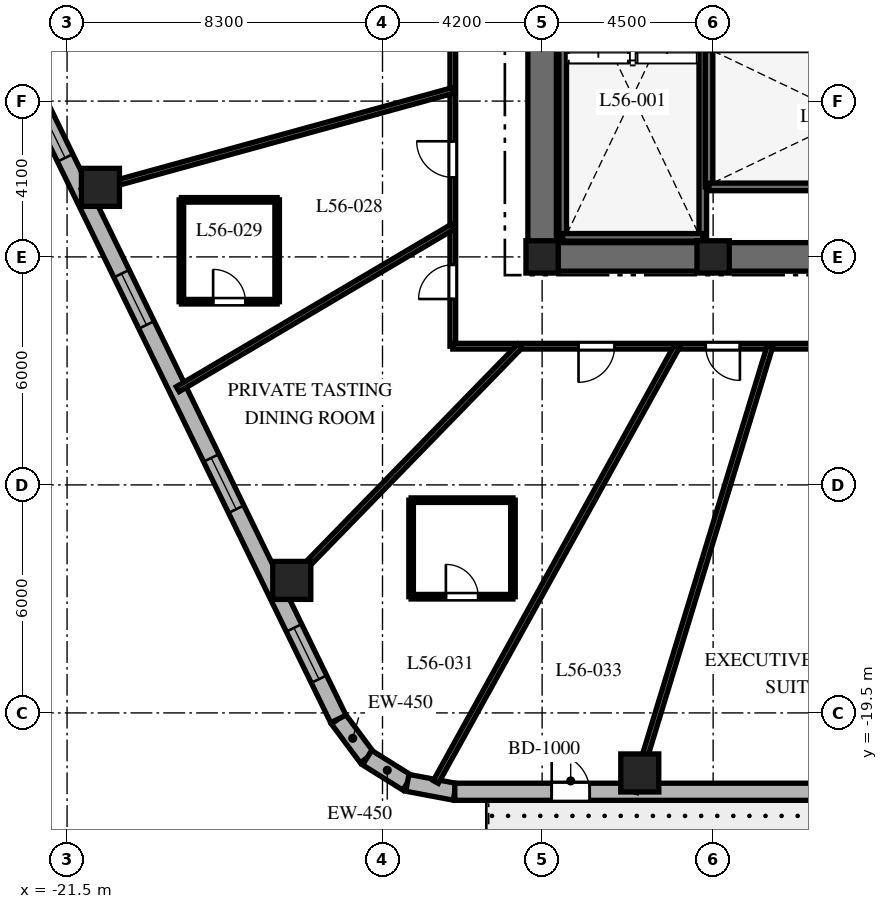
"""IFC4 building model, lengths in metres.
Left out: names, types, materials, properties, quantities, classifications, styles, units other than length and angle.
Written with IfcOpenShell. Run it as: python <this file> out.ifc"""

import sys

from ifc_helpers import new_model, si_unit, direction, frame, frame_2d, origin, origin_2d, place, context, subcontext, project, spatial, rectangle, extrude, element, fill, save


model = new_model("IFC4")
c1 = context("Model", 3, precision=1e-05, world=origin(), true_north=direction((0.0, 1.0)))
c2 = subcontext(c1, "Body", "Model", "MODEL_VIEW")
j1 = project(units=[si_unit("LENGTHUNIT", "METRE"), si_unit("PLANEANGLEUNIT", "RADIAN")], contexts=[c1])
p1 = place(None, origin())
s1 = spatial("IfcSite", under=j1, at=p1, CompositionType="ELEMENT")
p2 = place(p1, origin())
s2 = spatial("IfcBuilding", under=s1, at=p2, CompositionType="ELEMENT")
p3 = place(p2, frame((0.0, 0.0, 225.5)))
s3 = spatial("IfcBuildingStorey", under=s2, at=p3, CompositionType="ELEMENT", Elevation=225.5)
p4 = place(p3, frame((-9.375, -7.5, 0.0), z_axis=(0.0, 0.0, 1.0), x_axis=(1.0, 0.0, 0.0)))
e1 = element("IfcWall", 1, at=p4, inside=s3, PredefinedType="SHEAR", context=c2, shape_type="SweptSolid", body=[
    extrude(rectangle(XDim=18.75, YDim=0.75, at=frame_2d((9.375, 0.0))), origin(), (0.0, 0.0, 1.0), 3.8),
])
p5 = place(p4, frame((9.425, 0.0, 0.0)))
e2 = element("IfcOpeningElement", 2, at=p5, cuts=e1, PredefinedType="OPENING", context=c2, shape_type="SweptSolid", body=[
    extrude(rectangle(XDim=1.0, YDim=2.15, at=frame_2d((0.5, 1.075))), frame((0.0, 0.385, 0.0), z_axis=(0.0, -1.0, 0.0), x_axis=(1.0, 0.0, 0.0)), (0.0, 0.0, 1.0), 0.77),
])
p6 = place(p3, frame((-9.0, -7.125, 0.0), z_axis=(0.0, 0.0, 1.0), x_axis=(0.0, 1.0, 0.0)))
e3 = element("IfcWall", 3, at=p6, inside=s3, PredefinedType="SHEAR", context=c2, shape_type="SweptSolid", body=[
    extrude(rectangle(XDim=14.25, YDim=0.75, at=frame_2d((7.125, 0.0))), origin(), (0.0, 0.0, 1.0), 3.8),
])
p7 = place(p6, frame((10.25, 0.0, 0.0)))
e4 = element("IfcOpeningElement", 4, at=p7, cuts=e3, PredefinedType="OPENING", context=c2, shape_type="SweptSolid", body=[
    extrude(rectangle(XDim=1.05, YDim=2.15, at=frame_2d((0.525, 1.075))), frame((0.0, 0.385, 0.0), z_axis=(0.0, -1.0, 0.0), x_axis=(1.0, 0.0, 0.0)), (0.0, 0.0, 1.0), 0.77),
])
for number, where, z_axis, x_axis in (
    (5, (-8.458, -6.985, 0.0), (0.0, 0.0, 1.0), (0.0, 1.0, 0.0)),
    (6, (-4.772, -6.985, 0.0), (0.0, 0.0, 1.0), (0.0, 1.0, 0.0)),
):
    element("IfcWall", number, at=place(p3, frame(where, z_axis=z_axis, x_axis=x_axis)), inside=s3, PredefinedType="SHEAR", context=c2, shape_type="SweptSolid", body=[
        extrude(rectangle(XDim=9.143, YDim=0.2, at=frame_2d((4.572, 0.0))), origin(), (0.0, 0.0, 1.0), 3.8),
    ])
for number, where, z_axis, x_axis in (
    (7, (-8.458, -6.985, 0.0), (0.0, 0.0, 1.0), (1.0, 0.0, 0.0)),
    (8, (-4.608, -5.658, 0.0), (0.0, 0.0, 1.0), (0.0, 1.0, 0.0)),
):
    element("IfcWall", number, at=place(p3, frame(where, z_axis=z_axis, x_axis=x_axis)), inside=s3, PredefinedType="SHEAR", context=c2, shape_type="SweptSolid", body=[
        extrude(rectangle(XDim=3.686, YDim=0.2, at=frame_2d((1.843, 0.0))), origin(), (0.0, 0.0, 1.0), 3.8),
    ])
p8 = place(p3, frame((-4.608, -5.658, 0.0), z_axis=(0.0, 0.0, 1.0), x_axis=(1.0, 0.0, 0.0)))
e9 = element("IfcWall", 9, at=p8, inside=s3, PredefinedType="SHEAR", context=c2, shape_type="SweptSolid", body=[
    extrude(rectangle(XDim=9.166, YDim=0.2, at=frame_2d((4.583, 0.0))), origin(), (0.0, 0.0, 1.0), 3.8),
])
p9 = place(p8, frame((7.45, 0.0, 0.0)))
e10 = element("IfcOpeningElement", 10, at=p9, cuts=e9, PredefinedType="OPENING", context=c2, shape_type="SweptSolid", body=[
    extrude(rectangle(XDim=1.0, YDim=2.15, at=frame_2d((0.5, 1.075))), frame((0.0, 0.11, 0.0), z_axis=(0.0, -1.0, 0.0), x_axis=(1.0, 0.0, 0.0)), (0.0, 0.0, 1.0), 0.22),
])
for number, where, z_axis, x_axis in (
    (11, (-9.0, -7.5, 0.0), (0.0, 0.0, 1.0), (1.0, 0.0, 0.0)),
    (12, (-4.5, -7.5, 0.0), (0.0, 0.0, 1.0), (1.0, 0.0, 0.0)),
):
    element("IfcColumn", number, at=place(p3, frame(where, z_axis=z_axis, x_axis=x_axis)), inside=s3, PredefinedType="COLUMN", context=c2, shape_type="SweptSolid", body=[
        extrude(rectangle(XDim=0.85, YDim=0.85, at=origin_2d()), origin(), (0.0, 0.0, 1.0), 3.8),
    ])
for number, where, z_axis, x_axis in (
    (13, (-6.43, -21.08, 0.0), (0.0, 0.0, 1.0), (1.0, 0.0, 0.0)),
    (14, (-20.622, -5.67, 0.0), (0.0, 0.0, 1.0), (1.0, 0.0, 0.0)),
    (15, (-15.587, -16.013, 0.0), (0.0, 0.0, 1.0), (1.0, 0.0, 0.0)),
):
    element("IfcColumn", number, at=place(p3, frame(where, z_axis=z_axis, x_axis=x_axis)), inside=s3, PredefinedType="COLUMN", context=c2, shape_type="SweptSolid", body=[
        extrude(rectangle(XDim=1.0, YDim=1.0, at=origin_2d()), origin(), (0.0, 0.0, 1.0), 3.8),
    ])
p10 = place(p3, frame((-14.362, -19.658, 0.0), z_axis=(0.0, 0.0, 1.0), x_axis=(0.596642462792, -0.80250717853, 0.0)))
e16 = element("IfcWall", 16, at=p10, inside=s3, PredefinedType="SOLIDWALL", context=c2, shape_type="SweptSolid", body=[
    extrude(rectangle(XDim=1.27, YDim=0.45, at=frame_2d((0.635, 0.0))), origin(), (0.0, 0.0, 1.0), 3.5),
])
p11 = place(p3, frame((-13.604, -20.678, 0.0), z_axis=(0.0, 0.0, 1.0), x_axis=(0.847910404124, -0.53013955387, 0.0)))
e17 = element("IfcWall", 17, at=p11, inside=s3, PredefinedType="SOLIDWALL", context=c2, shape_type="SweptSolid", body=[
    extrude(rectangle(XDim=1.249, YDim=0.45, at=frame_2d((0.624, 0.0))), origin(), (0.0, 0.0, 1.0), 3.5),
])
p12 = place(p3, frame((-12.546, -21.34, 0.0), z_axis=(0.0, 0.0, 1.0), x_axis=(0.982686750835, -0.18527479519, 0.0)))
e18 = element("IfcWall", 18, at=p12, inside=s3, PredefinedType="SOLIDWALL", context=c2, shape_type="SweptSolid", body=[
    extrude(rectangle(XDim=1.27, YDim=0.45, at=frame_2d((0.635, 0.0))), origin(), (0.0, 0.0, 1.0), 3.5),
])
p13 = place(p3, frame((-11.298, -21.575, 0.0), z_axis=(0.0, 0.0, 1.0), x_axis=(1.0, 0.0, 0.0)))
e19 = element("IfcWall", 19, at=p13, inside=s3, PredefinedType="SOLIDWALL", context=c2, shape_type="SweptSolid", body=[
    extrude(rectangle(XDim=24.399, YDim=0.45, at=frame_2d((12.2, 0.0))), origin(), (0.0, 0.0, 1.0), 3.5),
])
p14 = place(p13, frame((2.55, 0.0, 0.0)))
e20 = element("IfcOpeningElement", 20, at=p14, cuts=e19, PredefinedType="OPENING", context=c2, shape_type="SweptSolid", body=[
    extrude(rectangle(XDim=1.0, YDim=2.15, at=frame_2d((0.5, 1.075))), frame((0.0, 0.235, 0.0), z_axis=(0.0, -1.0, 0.0), x_axis=(1.0, 0.0, 0.0)), (0.0, 0.0, 1.0), 0.47),
])
p15 = place(p13, frame((11.151, 0.0, 0.8)))
e21 = element("IfcOpeningElement", 21, at=p15, cuts=e19, PredefinedType="OPENING", context=c2, shape_type="SweptSolid", body=[
    extrude(rectangle(XDim=2.1, YDim=1.85, at=frame_2d((1.05, 0.925))), frame((0.0, 0.235, 0.0), z_axis=(0.0, -1.0, 0.0), x_axis=(1.0, 0.0, 0.0)), (0.0, 0.0, 1.0), 0.47),
])
p16 = place(p13, frame((20.996, 0.0, 0.8)))
e22 = element("IfcOpeningElement", 22, at=p16, cuts=e19, PredefinedType="OPENING", context=c2, shape_type="SweptSolid", body=[
    extrude(rectangle(XDim=2.1, YDim=1.85, at=frame_2d((1.05, 0.925))), frame((0.0, 0.235, 0.0), z_axis=(0.0, -1.0, 0.0), x_axis=(1.0, 0.0, 0.0)), (0.0, 0.0, 1.0), 0.47),
])
p17 = place(p3, frame((-22.74, -2.452, 0.0), z_axis=(0.0, 0.0, 1.0), x_axis=(0.437753424814, -0.899095066755, 0.0)))
e23 = element("IfcWall", 23, at=p17, inside=s3, PredefinedType="SOLIDWALL", context=c2, shape_type="SweptSolid", body=[
    extrude(rectangle(XDim=19.137, YDim=0.45, at=frame_2d((9.569, 0.0))), origin(), (0.0, 0.0, 1.0), 3.5),
])
p18 = place(p17, frame((1.216, 0.0, 0.8)))
e24 = element("IfcOpeningElement", 24, at=p18, cuts=e23, PredefinedType="OPENING", context=c2, shape_type="SweptSolid", body=[
    extrude(rectangle(XDim=1.5, YDim=1.8, at=frame_2d((0.75, 0.9))), frame((0.0, 0.235, 0.0), z_axis=(0.0, -1.0, 0.0), x_axis=(1.0, 0.0, 0.0)), (0.0, 0.0, 1.0), 0.47),
])
p19 = place(p17, frame((6.105, 0.0, 0.8)))
e25 = element("IfcOpeningElement", 25, at=p19, cuts=e23, PredefinedType="OPENING", context=c2, shape_type="SweptSolid", body=[
    extrude(rectangle(XDim=1.5, YDim=1.8, at=frame_2d((0.75, 0.9))), frame((0.0, 0.235, 0.0), z_axis=(0.0, -1.0, 0.0), x_axis=(1.0, 0.0, 0.0)), (0.0, 0.0, 1.0), 0.47),
])
p20 = place(p17, frame((11.499, 0.0, 0.8)))
e26 = element("IfcOpeningElement", 26, at=p20, cuts=e23, PredefinedType="OPENING", context=c2, shape_type="SweptSolid", body=[
    extrude(rectangle(XDim=1.5, YDim=1.8, at=frame_2d((0.75, 0.9))), frame((0.0, 0.235, 0.0), z_axis=(0.0, -1.0, 0.0), x_axis=(1.0, 0.0, 0.0)), (0.0, 0.0, 1.0), 0.47),
])
p21 = place(p17, frame((16.473, 0.0, 0.8)))
e27 = element("IfcOpeningElement", 27, at=p21, cuts=e23, PredefinedType="OPENING", context=c2, shape_type="SweptSolid", body=[
    extrude(rectangle(XDim=1.5, YDim=1.8, at=frame_2d((0.75, 0.9))), frame((0.0, 0.235, 0.0), z_axis=(0.0, -1.0, 0.0), x_axis=(1.0, 0.0, 0.0)), (0.0, 0.0, 1.0), 0.47),
])
p22 = place(p3, frame((-11.35, -9.85, 0.0), z_axis=(0.0, 0.0, 1.0), x_axis=(0.0, 1.0, 0.0)))
e28 = element("IfcWall", 28, at=p22, inside=s3, PredefinedType="PARTITIONING", context=c2, shape_type="SweptSolid", body=[
    extrude(rectangle(XDim=12.4, YDim=0.15, at=frame_2d((6.2, 0.0))), origin(), (0.0, 0.0, 1.0), 2.99),
])
p23 = place(p22, frame((8.835, 0.0, 0.0)))
e29 = element("IfcOpeningElement", 29, at=p23, cuts=e28, PredefinedType="OPENING", context=c2, shape_type="SweptSolid", body=[
    extrude(rectangle(XDim=0.95, YDim=2.03, at=frame_2d((0.475, 1.015))), frame((0.0, 0.085, 0.0), z_axis=(0.0, -1.0, 0.0), x_axis=(1.0, 0.0, 0.0)), (0.0, 0.0, 1.0), 0.17),
])
p24 = place(p22, frame((4.443, 0.0, 0.0)))
e30 = element("IfcOpeningElement", 30, at=p24, cuts=e28, PredefinedType="OPENING", context=c2, shape_type="SweptSolid", body=[
    extrude(rectangle(XDim=0.95, YDim=2.03, at=frame_2d((0.475, 1.015))), frame((0.0, 0.085, 0.0), z_axis=(0.0, -1.0, 0.0), x_axis=(1.0, 0.0, 0.0)), (0.0, 0.0, 1.0), 0.17),
])
p25 = place(p22, frame((1.242, 0.0, 0.0)))
e31 = element("IfcOpeningElement", 31, at=p25, cuts=e28, PredefinedType="OPENING", context=c2, shape_type="SweptSolid", body=[
    extrude(rectangle(XDim=0.9, YDim=2.03, at=frame_2d((0.45, 1.015))), frame((0.0, 0.085, 0.0), z_axis=(0.0, -1.0, 0.0), x_axis=(1.0, 0.0, 0.0)), (0.0, 0.0, 1.0), 0.17),
])
p26 = place(p3, frame((-0.92, -9.85, 0.0), z_axis=(0.0, 0.0, 1.0), x_axis=(-1.0, 0.0, 0.0)))
e32 = element("IfcWall", 32, at=p26, inside=s3, PredefinedType="PARTITIONING", context=c2, shape_type="SweptSolid", body=[
    extrude(rectangle(XDim=10.43, YDim=0.15, at=frame_2d((5.215, 0.0))), origin(), (0.0, 0.0, 1.0), 2.99),
])
p27 = place(p26, frame((6.172, 0.0, 0.0)))
e33 = element("IfcOpeningElement", 33, at=p27, cuts=e32, PredefinedType="OPENING", context=c2, shape_type="SweptSolid", body=[
    extrude(rectangle(XDim=0.95, YDim=2.03, at=frame_2d((0.475, 1.015))), frame((0.0, 0.085, 0.0), z_axis=(0.0, -1.0, 0.0), x_axis=(1.0, 0.0, 0.0)), (0.0, 0.0, 1.0), 0.17),
])
p28 = place(p26, frame((2.875, 0.0, 0.0)))
e34 = element("IfcOpeningElement", 34, at=p28, cuts=e32, PredefinedType="OPENING", context=c2, shape_type="SweptSolid", body=[
    extrude(rectangle(XDim=0.9, YDim=2.03, at=frame_2d((0.45, 1.015))), frame((0.0, 0.085, 0.0), z_axis=(0.0, -1.0, 0.0), x_axis=(1.0, 0.0, 0.0)), (0.0, 0.0, 1.0), 0.17),
])
p29 = place(p3, frame((-11.35, -3.121, 0.0), z_axis=(0.0, 0.0, 1.0), x_axis=(-0.964212793822, -0.265129568758, 0.0)))
e35 = element("IfcWall", 35, at=p29, inside=s3, PredefinedType="PARTITIONING", context=c2, shape_type="SweptSolid", body=[
    extrude(rectangle(XDim=10.12, YDim=0.15, at=frame_2d((5.06, 0.0))), origin(), (0.0, 0.0, 1.0), 2.74),
])
p30 = place(p3, frame((-11.35, -6.705, 0.0), z_axis=(0.0, 0.0, 1.0), x_axis=(-0.86097625004, -0.508645158108, 0.0)))
e36 = element("IfcWall", 36, at=p30, inside=s3, PredefinedType="PARTITIONING", context=c2, shape_type="SweptSolid", body=[
    extrude(rectangle(XDim=8.406, YDim=0.15, at=frame_2d((4.203, 0.0))), origin(), (0.0, 0.0, 1.0), 2.74),
])
p31 = place(p3, frame((-9.588, -9.85, 0.0), z_axis=(0.0, 0.0, 1.0), x_axis=(-0.697519469595, -0.716565830567, 0.0)))
e37 = element("IfcWall", 37, at=p31, inside=s3, PredefinedType="PARTITIONING", context=c2, shape_type="SweptSolid", body=[
    extrude(rectangle(XDim=9.126, YDim=0.15, at=frame_2d((4.563, 0.0))), origin(), (0.0, 0.0, 1.0), 2.74),
])
p32 = place(p3, frame((-5.451, -9.85, 0.0), z_axis=(0.0, 0.0, 1.0), x_axis=(-0.484188830955, -0.87496352837, 0.0)))
e38 = element("IfcWall", 38, at=p32, inside=s3, PredefinedType="PARTITIONING", context=c2, shape_type="SweptSolid", body=[
    extrude(rectangle(XDim=13.107, YDim=0.15, at=frame_2d((6.553, 0.0))), origin(), (0.0, 0.0, 1.0), 2.74),
])
p33 = place(p3, frame((-3.004, -9.85, 0.0), z_axis=(0.0, 0.0, 1.0), x_axis=(-0.291775760688, -0.956486751333, 0.0)))
e39 = element("IfcWall", 39, at=p33, inside=s3, PredefinedType="PARTITIONING", context=c2, shape_type="SweptSolid", body=[
    extrude(rectangle(XDim=12.258, YDim=0.15, at=frame_2d((6.129, 0.0))), origin(), (0.0, 0.0, 1.0), 2.74),
])
p34 = place(p3, frame((-18.492, -8.679, 0.0), z_axis=(0.0, 0.0, 1.0), x_axis=(1.0, 0.0, 0.0)))
e40 = element("IfcWall", 40, at=p34, inside=s3, PredefinedType="PARTITIONING", context=c2, shape_type="SweptSolid", body=[
    extrude(rectangle(XDim=2.52, YDim=0.12, at=frame_2d((1.26, 0.0))), origin(), (0.0, 0.0, 1.0), 3.5),
])
p35 = place(p34, frame((0.835, 0.0, 0.0)))
e41 = element("IfcOpeningElement", 41, at=p35, cuts=e40, PredefinedType="OPENING", context=c2, shape_type="SweptSolid", body=[
    extrude(rectangle(XDim=0.85, YDim=2.03, at=frame_2d((0.425, 1.015))), frame((0.0, 0.07, 0.0), z_axis=(0.0, -1.0, 0.0), x_axis=(1.0, 0.0, 0.0)), (0.0, 0.0, 1.0), 0.14),
])
p36 = place(p3, frame((-15.972, -8.679, 0.0), z_axis=(0.0, 0.0, 1.0), x_axis=(0.0, 1.0, 0.0)))
e42 = element("IfcWall", 42, at=p36, inside=s3, PredefinedType="PARTITIONING", context=c2, shape_type="SweptSolid", body=[
    extrude(rectangle(XDim=2.68, YDim=0.12, at=frame_2d((1.34, 0.0))), origin(), (0.0, 0.0, 1.0), 2.99),
])
p37 = place(p3, frame((-15.972, -5.999, 0.0), z_axis=(0.0, 0.0, 1.0), x_axis=(-1.0, 0.0, 0.0)))
e43 = element("IfcWall", 43, at=p37, inside=s3, PredefinedType="PARTITIONING", context=c2, shape_type="SweptSolid", body=[
    extrude(rectangle(XDim=2.52, YDim=0.12, at=frame_2d((1.26, 0.0))), origin(), (0.0, 0.0, 1.0), 2.94),
])
p38 = place(p3, frame((-18.492, -5.999, 0.0), z_axis=(0.0, 0.0, 1.0), x_axis=(0.0, -1.0, 0.0)))
e44 = element("IfcWall", 44, at=p38, inside=s3, PredefinedType="PARTITIONING", context=c2, shape_type="SweptSolid", body=[
    extrude(rectangle(XDim=2.68, YDim=0.12, at=frame_2d((1.34, 0.0))), origin(), (0.0, 0.0, 1.0), 2.99),
])
p39 = place(p3, frame((-12.447, -16.442, 0.0), z_axis=(0.0, 0.0, 1.0), x_axis=(1.0, 0.0, 0.0)))
e45 = element("IfcWall", 45, at=p39, inside=s3, PredefinedType="PARTITIONING", context=c2, shape_type="SweptSolid", body=[
    extrude(rectangle(XDim=2.68, YDim=0.12, at=frame_2d((1.34, 0.0))), origin(), (0.0, 0.0, 1.0), 3.5),
])
p40 = place(p39, frame((0.915, 0.0, 0.0)))
e46 = element("IfcOpeningElement", 46, at=p40, cuts=e45, PredefinedType="OPENING", context=c2, shape_type="SweptSolid", body=[
    extrude(rectangle(XDim=0.85, YDim=2.03, at=frame_2d((0.425, 1.015))), frame((0.0, 0.07, 0.0), z_axis=(0.0, -1.0, 0.0), x_axis=(1.0, 0.0, 0.0)), (0.0, 0.0, 1.0), 0.14),
])
p41 = place(p3, frame((-9.767, -16.442, 0.0), z_axis=(0.0, 0.0, 1.0), x_axis=(0.0, 1.0, 0.0)))
e47 = element("IfcWall", 47, at=p41, inside=s3, PredefinedType="PARTITIONING", context=c2, shape_type="SweptSolid", body=[
    extrude(rectangle(XDim=2.54, YDim=0.12, at=frame_2d((1.27, 0.0))), origin(), (0.0, 0.0, 1.0), 3.073),
])
p42 = place(p3, frame((-9.767, -13.902, 0.0), z_axis=(0.0, 0.0, 1.0), x_axis=(-1.0, 0.0, 0.0)))
e48 = element("IfcWall", 48, at=p42, inside=s3, PredefinedType="PARTITIONING", context=c2, shape_type="SweptSolid", body=[
    extrude(rectangle(XDim=2.68, YDim=0.12, at=frame_2d((1.34, 0.0))), origin(), (0.0, 0.0, 1.0), 3.073),
])
p43 = place(p3, frame((-12.447, -13.902, 0.0), z_axis=(0.0, 0.0, 1.0), x_axis=(0.0, -1.0, 0.0)))
e49 = element("IfcWall", 49, at=p43, inside=s3, PredefinedType="PARTITIONING", context=c2, shape_type="SweptSolid", body=[
    extrude(rectangle(XDim=2.54, YDim=0.12, at=frame_2d((1.27, 0.0))), origin(), (0.0, 0.0, 1.0), 3.5),
])
p44 = place(p14, origin())
e50 = element("IfcDoor", 50, at=p44, inside=s3, OperationType="SINGLE_SWING_LEFT", PredefinedType="DOOR", context=c2, shape_type="SweptSolid", body=[
    extrude(rectangle(XDim=1.0, YDim=2.15, at=frame_2d((0.5, 1.075))), frame((0.0, 0.025, 0.0), z_axis=(0.0, -1.0, 0.0), x_axis=(1.0, 0.0, 0.0)), (0.0, 0.0, 1.0), 0.05),
])
fill(e20, e50)
p45 = place(p18, origin())
e51 = element("IfcWindow", 51, at=p45, inside=s3, PartitioningType="SINGLE_PANEL", PredefinedType="WINDOW", context=c2, shape_type="SweptSolid", body=[
    extrude(rectangle(XDim=1.5, YDim=1.8, at=frame_2d((0.75, 0.9))), frame((0.0, 0.03, 0.0), z_axis=(0.0, -1.0, 0.0), x_axis=(1.0, 0.0, 0.0)), (0.0, 0.0, 1.0), 0.06),
])
fill(e24, e51)
p46 = place(p19, origin())
e52 = element("IfcWindow", 52, at=p46, inside=s3, PartitioningType="SINGLE_PANEL", PredefinedType="WINDOW", context=c2, shape_type="SweptSolid", body=[
    extrude(rectangle(XDim=1.5, YDim=1.8, at=frame_2d((0.75, 0.9))), frame((0.0, 0.03, 0.0), z_axis=(0.0, -1.0, 0.0), x_axis=(1.0, 0.0, 0.0)), (0.0, 0.0, 1.0), 0.06),
])
fill(e25, e52)
p47 = place(p20, origin())
e53 = element("IfcWindow", 53, at=p47, inside=s3, PartitioningType="SINGLE_PANEL", PredefinedType="WINDOW", context=c2, shape_type="SweptSolid", body=[
    extrude(rectangle(XDim=1.5, YDim=1.8, at=frame_2d((0.75, 0.9))), frame((0.0, 0.03, 0.0), z_axis=(0.0, -1.0, 0.0), x_axis=(1.0, 0.0, 0.0)), (0.0, 0.0, 1.0), 0.06),
])
fill(e26, e53)
p48 = place(p21, origin())
e54 = element("IfcWindow", 54, at=p48, inside=s3, PartitioningType="SINGLE_PANEL", PredefinedType="WINDOW", context=c2, shape_type="SweptSolid", body=[
    extrude(rectangle(XDim=1.5, YDim=1.8, at=frame_2d((0.75, 0.9))), frame((0.0, 0.03, 0.0), z_axis=(0.0, -1.0, 0.0), x_axis=(1.0, 0.0, 0.0)), (0.0, 0.0, 1.0), 0.06),
])
fill(e27, e54)
p49 = place(p24, origin())
e55 = element("IfcDoor", 55, at=p49, inside=s3, OperationType="SINGLE_SWING_RIGHT", PredefinedType="DOOR", context=c2, shape_type="SweptSolid", body=[
    extrude(rectangle(XDim=0.95, YDim=2.03, at=frame_2d((0.475, 1.015))), frame((0.0, 0.025, 0.0), z_axis=(0.0, -1.0, 0.0), x_axis=(1.0, 0.0, 0.0)), (0.0, 0.0, 1.0), 0.05),
])
fill(e30, e55)
p50 = place(p35, origin())
e56 = element("IfcDoor", 56, at=p50, inside=s3, OperationType="SINGLE_SWING_LEFT", PredefinedType="DOOR", context=c2, shape_type="SweptSolid", body=[
    extrude(rectangle(XDim=0.85, YDim=2.03, at=frame_2d((0.425, 1.015))), frame((0.0, 0.025, 0.0), z_axis=(0.0, -1.0, 0.0), x_axis=(1.0, 0.0, 0.0)), (0.0, 0.0, 1.0), 0.05),
])
fill(e41, e56)
p51 = place(p25, origin())
e57 = element("IfcDoor", 57, at=p51, inside=s3, OperationType="SINGLE_SWING_LEFT", PredefinedType="DOOR", context=c2, shape_type="SweptSolid", body=[
    extrude(rectangle(XDim=0.9, YDim=2.03, at=frame_2d((0.45, 1.015))), frame((0.0, 0.025, 0.0), z_axis=(0.0, -1.0, 0.0), x_axis=(1.0, 0.0, 0.0)), (0.0, 0.0, 1.0), 0.05),
])
fill(e31, e57)
p52 = place(p27, origin())
e58 = element("IfcDoor", 58, at=p52, inside=s3, OperationType="SINGLE_SWING_RIGHT", PredefinedType="DOOR", context=c2, shape_type="SweptSolid", body=[
    extrude(rectangle(XDim=0.95, YDim=2.03, at=frame_2d((0.475, 1.015))), frame((0.0, 0.025, 0.0), z_axis=(0.0, -1.0, 0.0), x_axis=(1.0, 0.0, 0.0)), (0.0, 0.0, 1.0), 0.05),
])
fill(e33, e58)
p53 = place(p40, origin())
e59 = element("IfcDoor", 59, at=p53, inside=s3, OperationType="SINGLE_SWING_LEFT", PredefinedType="DOOR", context=c2, shape_type="SweptSolid", body=[
    extrude(rectangle(XDim=0.85, YDim=2.03, at=frame_2d((0.425, 1.015))), frame((0.0, 0.025, 0.0), z_axis=(0.0, -1.0, 0.0), x_axis=(1.0, 0.0, 0.0)), (0.0, 0.0, 1.0), 0.05),
])
fill(e46, e59)
p54 = place(p28, origin())
e60 = element("IfcDoor", 60, at=p54, inside=s3, OperationType="SINGLE_SWING_LEFT", PredefinedType="DOOR", context=c2, shape_type="SweptSolid", body=[
    extrude(rectangle(XDim=0.9, YDim=2.03, at=frame_2d((0.45, 1.015))), frame((0.0, 0.025, 0.0), z_axis=(0.0, -1.0, 0.0), x_axis=(1.0, 0.0, 0.0)), (0.0, 0.0, 1.0), 0.05),
])
fill(e34, e60)
save(model, sys.argv[1])
